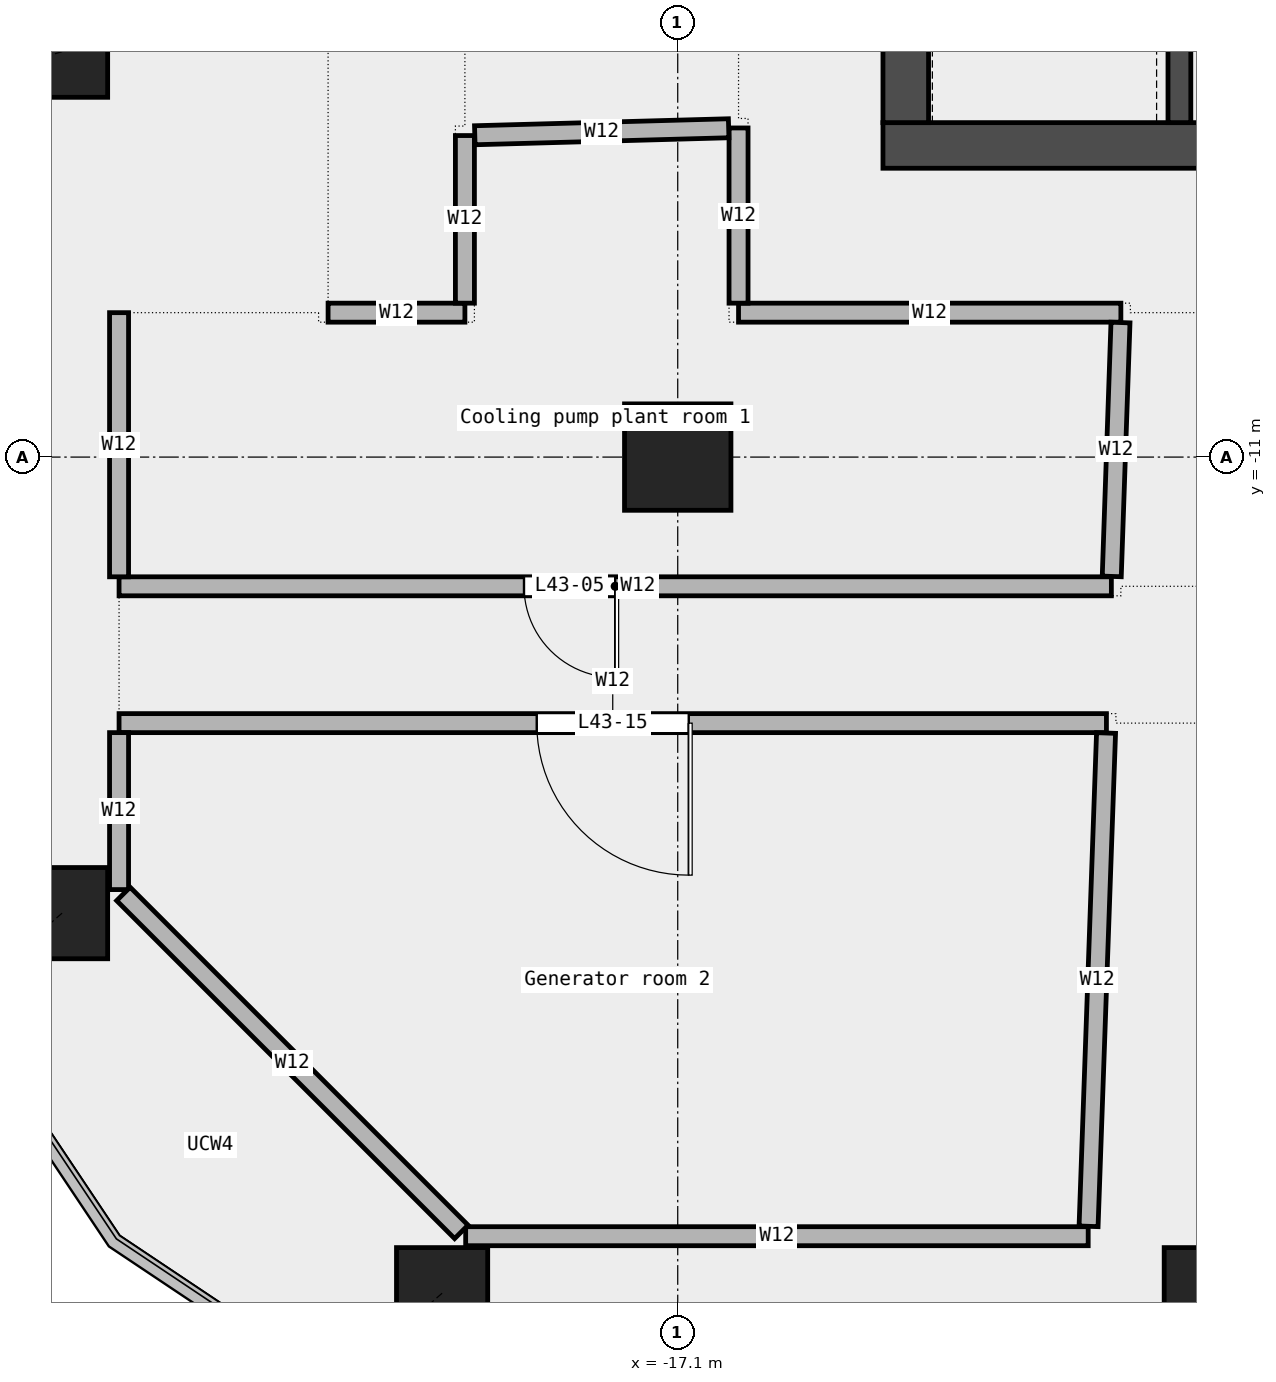
"""IFC4 building model, lengths in metres.
Left out: names, types, materials, properties, quantities, classifications, styles, units other than length and angle.
Written with IfcOpenShell. Run it as: python <this file> out.ifc"""

import sys

from ifc_helpers import new_model, si_unit, direction, frame, frame_2d, origin, origin_2d, place, context, subcontext, project, spatial, rectangle, extrude, element, fill, save


model = new_model("IFC4")
c1 = context("Model", 3, precision=1e-05, world=origin(), true_north=direction((0.0, 1.0)))
c2 = subcontext(c1, "Body", "Model", "MODEL_VIEW")
j1 = project(units=[si_unit("LENGTHUNIT", "METRE"), si_unit("PLANEANGLEUNIT", "RADIAN")], contexts=[c1])
p1 = place(None, origin())
s1 = spatial("IfcSite", under=j1, at=p1, CompositionType="ELEMENT")
p2 = place(p1, origin())
s2 = spatial("IfcBuilding", under=s1, at=p2, CompositionType="ELEMENT")
p3 = place(p2, frame((0.0, 0.0, 205.0)))
s3 = spatial("IfcBuildingStorey", under=s2, at=p3, CompositionType="ELEMENT", Elevation=205.0)
p4 = place(p3, frame((-20.2, -22.0, 0.0), z_axis=(-0.304776537036, -0.266669504678, 0.914329611107), x_axis=(0.658490670892, -0.752588889333, 0.0)))
e1 = element("IfcColumn", 1, at=p4, inside=s3, PredefinedType="COLUMN", context=c2, shape_type="SweptSolid", body=[
    extrude(rectangle(XDim=1.2, YDim=1.2, at=origin_2d()), origin(), (0.0, 0.0, 1.0), 6.125),
])
p5 = place(p3, frame((-10.1, -22.0, 0.0), z_axis=(-0.157990952402, -0.276473835095, 0.947945714409), x_axis=(0.868235155486, -0.496152914712, 0.0)))
e2 = element("IfcColumn", 2, at=p5, inside=s3, PredefinedType="COLUMN", context=c2, shape_type="SweptSolid", body=[
    extrude(rectangle(XDim=1.2, YDim=1.2, at=origin_2d()), origin(), (0.0, 0.0, 1.0), 5.908),
])
p6 = place(p3, frame((-25.2, -5.667, 0.0), z_axis=(-0.314891320665, -0.091839869877, 0.944673961995), x_axis=(0.279990357269, -0.960002812411, 0.0)))
e3 = element("IfcColumn", 3, at=p6, inside=s3, PredefinedType="COLUMN", context=c2, shape_type="SweptSolid", body=[
    extrude(rectangle(XDim=1.2, YDim=1.2, at=origin_2d()), origin(), (0.0, 0.0, 1.0), 5.928),
])
p7 = place(p3, frame((-25.2, -17.0, 0.0), z_axis=(-0.304776537036, -0.266669504678, 0.914329611107), x_axis=(0.658490670892, -0.752588889333, 0.0)))
e4 = element("IfcColumn", 4, at=p7, inside=s3, PredefinedType="COLUMN", context=c2, shape_type="SweptSolid", body=[
    extrude(rectangle(XDim=1.2, YDim=1.2, at=origin_2d()), origin(), (0.0, 0.0, 1.0), 6.125),
])
p8 = place(p3, frame((-17.1, -11.0, 0.0), z_axis=(0.0, 0.0, 1.0), x_axis=(1.0, 0.0, 0.0)))
e5 = element("IfcColumn", 5, at=p8, inside=s3, PredefinedType="COLUMN", context=c2, shape_type="SweptSolid", body=[
    extrude(rectangle(XDim=1.4, YDim=1.4, at=origin_2d()), origin(), (0.0, 0.0, 1.0), 5.6),
])
p9 = place(p3, frame((-19.89, -21.25, 0.0), z_axis=(0.0, 0.0, 1.0), x_axis=(1.0, 0.0, 0.0)))
e6 = element("IfcWall", 6, at=p9, inside=s3, PredefinedType="PARTITIONING", context=c2, shape_type="SweptSolid", body=[
    extrude(rectangle(XDim=8.19, YDim=0.25, at=frame_2d((4.095, 0.0))), origin(), (0.0, 0.0, 1.0), 5.6),
])
p10 = place(p3, frame((-24.45, -14.5, 0.0), z_axis=(0.0, 0.0, 1.0), x_axis=(1.0, 0.0, 0.0)))
e7 = element("IfcWall", 7, at=p10, inside=s3, PredefinedType="PARTITIONING", context=c2, shape_type="SweptSolid", body=[
    extrude(rectangle(XDim=12.99, YDim=0.25, at=frame_2d((6.495, 0.0))), origin(), (0.0, 0.0, 1.0), 5.6),
])
p11 = place(p10, frame((5.495, 0.0, 0.0)))
e8 = element("IfcOpeningElement", 8, at=p11, cuts=e7, PredefinedType="OPENING", context=c2, shape_type="SweptSolid", body=[
    extrude(rectangle(XDim=2.0, YDim=2.1, at=frame_2d((1.0, 1.05))), frame((0.0, 0.137, 0.0), z_axis=(0.0, -1.0, 0.0), x_axis=(1.0, 0.0, 0.0)), (0.0, 0.0, 1.0), 0.274),
])
p12 = place(p3, frame((-24.45, -12.7, 0.0), z_axis=(0.0, 0.0, 1.0), x_axis=(1.0, 0.0, 0.0)))
e9 = element("IfcWall", 9, at=p12, inside=s3, PredefinedType="PARTITIONING", context=c2, shape_type="SweptSolid", body=[
    extrude(rectangle(XDim=13.055, YDim=0.25, at=frame_2d((6.527, 0.0))), origin(), (0.0, 0.0, 1.0), 5.6),
])
p13 = place(p12, frame((5.327, 0.0, 0.0)))
e10 = element("IfcOpeningElement", 10, at=p13, cuts=e9, PredefinedType="OPENING", context=c2, shape_type="SweptSolid", body=[
    extrude(rectangle(XDim=1.2, YDim=2.1, at=frame_2d((0.6, 1.05))), frame((0.0, 0.137, 0.0), z_axis=(0.0, -1.0, 0.0), x_axis=(1.0, 0.0, 0.0)), (0.0, 0.0, 1.0), 0.274),
])
p14 = place(p3, frame((-21.7, -9.1, 0.0), z_axis=(0.0, 0.0, 1.0), x_axis=(1.0, 0.0, 0.0)))
e11 = element("IfcWall", 11, at=p14, inside=s3, PredefinedType="PARTITIONING", context=c2, shape_type="SweptSolid", body=[
    extrude(rectangle(XDim=1.8, YDim=0.25, at=frame_2d((0.9, 0.0))), origin(), (0.0, 0.0, 1.0), 5.6),
])
p15 = place(p3, frame((-16.3, -9.1, 0.0), z_axis=(0.0, 0.0, 1.0), x_axis=(1.0, 0.0, 0.0)))
e12 = element("IfcWall", 12, at=p15, inside=s3, PredefinedType="PARTITIONING", context=c2, shape_type="SweptSolid", body=[
    extrude(rectangle(XDim=5.03, YDim=0.25, at=frame_2d((2.515, 0.0))), origin(), (0.0, 0.0, 1.0), 5.6),
])
p16 = place(p3, frame((-24.45, -16.69, 0.0), z_axis=(0.0, 0.0, 1.0), x_axis=(0.0, 1.0, 0.0)))
e13 = element("IfcWall", 13, at=p16, inside=s3, PredefinedType="PARTITIONING", context=c2, shape_type="SweptSolid", body=[
    extrude(rectangle(XDim=2.065, YDim=0.25, at=frame_2d((1.032, 0.0))), origin(), (0.0, 0.0, 1.0), 5.6),
])
p17 = place(p3, frame((-24.45, -12.575, 0.0), z_axis=(0.0, 0.0, 1.0), x_axis=(0.0, 1.0, 0.0)))
e14 = element("IfcWall", 14, at=p17, inside=s3, PredefinedType="PARTITIONING", context=c2, shape_type="SweptSolid", body=[
    extrude(rectangle(XDim=3.475, YDim=0.25, at=frame_2d((1.737, 0.0))), origin(), (0.0, 0.0, 1.0), 5.6),
])
p18 = place(p3, frame((-19.9, -8.975, 0.0), z_axis=(0.0, 0.0, 1.0), x_axis=(0.0, 1.0, 0.0)))
e15 = element("IfcWall", 15, at=p18, inside=s3, PredefinedType="PARTITIONING", context=c2, shape_type="SweptSolid", body=[
    extrude(rectangle(XDim=2.205, YDim=0.25, at=frame_2d((1.103, 0.0))), origin(), (0.0, 0.0, 1.0), 5.6),
])
p19 = place(p3, frame((-16.3, -8.975, 0.0), z_axis=(0.0, 0.0, 1.0), x_axis=(0.0, 1.0, 0.0)))
e16 = element("IfcWall", 16, at=p19, inside=s3, PredefinedType="PARTITIONING", context=c2, shape_type="SweptSolid", body=[
    extrude(rectangle(XDim=2.305, YDim=0.25, at=frame_2d((1.153, 0.0))), origin(), (0.0, 0.0, 1.0), 5.6),
])
p20 = place(p3, frame((-19.77, -6.766, 0.0), z_axis=(0.0, 0.0, 1.0), x_axis=(0.999620536712, 0.027546008504, 0.0)))
e17 = element("IfcWall", 17, at=p20, inside=s3, PredefinedType="PARTITIONING", context=c2, shape_type="SweptSolid", body=[
    extrude(rectangle(XDim=3.341, YDim=0.25, at=frame_2d((1.671, 0.0))), origin(), (0.0, 0.0, 1.0), 5.6),
])
p21 = place(p3, frame((-11.275, -9.23, 0.0), z_axis=(0.0, 0.0, 1.0), x_axis=(-0.03440692376, -0.999407906511, 0.0)))
e18 = element("IfcWall", 18, at=p21, inside=s3, PredefinedType="PARTITIONING", context=c2, shape_type="SweptSolid", body=[
    extrude(rectangle(XDim=3.342, YDim=0.25, at=frame_2d((1.671, 0.0))), origin(), (0.0, 0.0, 1.0), 5.6),
])
p22 = place(p3, frame((-11.465, -14.63, 0.0), z_axis=(0.0, 0.0, 1.0), x_axis=(-0.035412622455, -0.999372776381, 0.0)))
e19 = element("IfcWall", 19, at=p22, inside=s3, PredefinedType="PARTITIONING", context=c2, shape_type="SweptSolid", body=[
    extrude(rectangle(XDim=6.494, YDim=0.25, at=frame_2d((3.247, 0.0))), origin(), (0.0, 0.0, 1.0), 5.6),
])
p23 = place(p3, frame((-19.947, -21.193, 0.0), z_axis=(0.0, 0.0, 1.0), x_axis=(-0.707106781187, 0.707106781187, 0.0)))
e20 = element("IfcWall", 20, at=p23, inside=s3, PredefinedType="PARTITIONING", context=c2, shape_type="SweptSolid", body=[
    extrude(rectangle(XDim=6.288, YDim=0.25, at=frame_2d((3.144, 0.0))), origin(), (0.0, 0.0, 1.0), 5.6),
])
p24 = place(p3, frame((-14.4, -6.9, 0.0), z_axis=(0.0, 0.0, 1.0), x_axis=(1.0, 0.0, 0.0)))
e21 = element("IfcWall", 21, at=p24, inside=s3, PredefinedType="SHEAR", context=c2, shape_type="SweptSolid", body=[
    extrude(rectangle(XDim=28.8, YDim=0.6, at=frame_2d((14.4, 0.0))), origin(), (0.0, 0.0, 1.0), 5.7),
])
p25 = place(p24, frame((4.9, 0.0, 0.0)))
e22 = element("IfcOpeningElement", 22, at=p25, cuts=e21, PredefinedType="OPENING", context=c2, shape_type="SweptSolid", body=[
    extrude(rectangle(XDim=1.0, YDim=2.1, at=frame_2d((0.5, 1.05))), frame((0.0, 0.312, 0.0), z_axis=(0.0, -1.0, 0.0), x_axis=(1.0, 0.0, 0.0)), (0.0, 0.0, 1.0), 0.624),
])
p26 = place(p24, frame((8.462, 0.0, 0.0)))
e23 = element("IfcOpeningElement", 23, at=p26, cuts=e21, PredefinedType="OPENING", context=c2, shape_type="SweptSolid", body=[
    extrude(rectangle(XDim=1.0, YDim=2.1, at=frame_2d((0.5, 1.05))), frame((0.0, 0.312, 0.0), z_axis=(0.0, -1.0, 0.0), x_axis=(1.0, 0.0, 0.0)), (0.0, 0.0, 1.0), 0.624),
])
p27 = place(p24, frame((13.425, 0.0, 0.0)))
e24 = element("IfcOpeningElement", 24, at=p27, cuts=e21, PredefinedType="OPENING", context=c2, shape_type="SweptSolid", body=[
    extrude(rectangle(XDim=1.2, YDim=2.1, at=frame_2d((0.6, 1.05))), frame((0.0, 0.312, 0.0), z_axis=(0.0, -1.0, 0.0), x_axis=(1.0, 0.0, 0.0)), (0.0, 0.0, 1.0), 0.624),
])
p28 = place(p24, frame((18.75, 0.0, 0.0)))
e25 = element("IfcOpeningElement", 25, at=p28, cuts=e21, PredefinedType="OPENING", context=c2, shape_type="SweptSolid", body=[
    extrude(rectangle(XDim=1.8, YDim=2.1, at=frame_2d((0.9, 1.05))), frame((0.0, 0.312, 0.0), z_axis=(0.0, -1.0, 0.0), x_axis=(1.0, 0.0, 0.0)), (0.0, 0.0, 1.0), 0.624),
])
p29 = place(p24, frame((23.087, 0.0, 0.0)))
e26 = element("IfcOpeningElement", 26, at=p29, cuts=e21, PredefinedType="OPENING", context=c2, shape_type="SweptSolid", body=[
    extrude(rectangle(XDim=1.0, YDim=2.1, at=frame_2d((0.5, 1.05))), frame((0.0, 0.312, 0.0), z_axis=(0.0, -1.0, 0.0), x_axis=(1.0, 0.0, 0.0)), (0.0, 0.0, 1.0), 0.624),
])
p30 = place(p3, frame((-14.1, -6.6, 0.0), z_axis=(0.0, 0.0, 1.0), x_axis=(0.0, 1.0, 0.0)))
e27 = element("IfcWall", 27, at=p30, inside=s3, PredefinedType="SHEAR", context=c2, shape_type="SweptSolid", body=[
    extrude(rectangle(XDim=19.5, YDim=0.6, at=frame_2d((9.75, 0.0))), origin(), (0.0, 0.0, 1.0), 5.7),
])
p31 = place(p30, frame((9.3, 0.0, 0.0)))
e28 = element("IfcOpeningElement", 28, at=p31, cuts=e27, PredefinedType="OPENING", context=c2, shape_type="SweptSolid", body=[
    extrude(rectangle(XDim=1.8, YDim=2.1, at=frame_2d((0.9, 1.05))), frame((0.0, 0.312, 0.0), z_axis=(0.0, -1.0, 0.0), x_axis=(1.0, 0.0, 0.0)), (0.0, 0.0, 1.0), 0.624),
])
p32 = place(p3, frame((-10.5, -6.6, 0.0), z_axis=(0.0, 0.0, 1.0), x_axis=(0.0, 1.0, 0.0)))
e29 = element("IfcWall", 29, at=p32, inside=s3, PredefinedType="SHEAR", context=c2, shape_type="SweptSolid", body=[
    extrude(rectangle(XDim=8.55, YDim=0.3, at=frame_2d((4.275, 0.0))), origin(), (0.0, 0.0, 1.0), 5.7),
])
p33 = place(p13, origin())
e30 = element("IfcDoor", 30, at=p33, inside=s3, OperationType="SINGLE_SWING_LEFT", PredefinedType="DOOR", context=c2, shape_type="SweptSolid", body=[
    extrude(rectangle(XDim=1.2, YDim=2.1, at=frame_2d((0.6, 1.05))), frame((0.0, 0.025, 0.0), z_axis=(0.0, -1.0, 0.0), x_axis=(1.0, 0.0, 0.0)), (0.0, 0.0, 1.0), 0.05),
])
fill(e10, e30)
p34 = place(p11, origin())
e31 = element("IfcDoor", 31, at=p34, inside=s3, OperationType="DOUBLE_DOOR_SINGLE_SWING", PredefinedType="DOOR", context=c2, shape_type="SweptSolid", body=[
    extrude(rectangle(XDim=2.0, YDim=2.1, at=frame_2d((1.0, 1.05))), frame((0.0, 0.025, 0.0), z_axis=(0.0, -1.0, 0.0), x_axis=(1.0, 0.0, 0.0)), (0.0, 0.0, 1.0), 0.05),
])
fill(e8, e31)
save(model, sys.argv[1])
